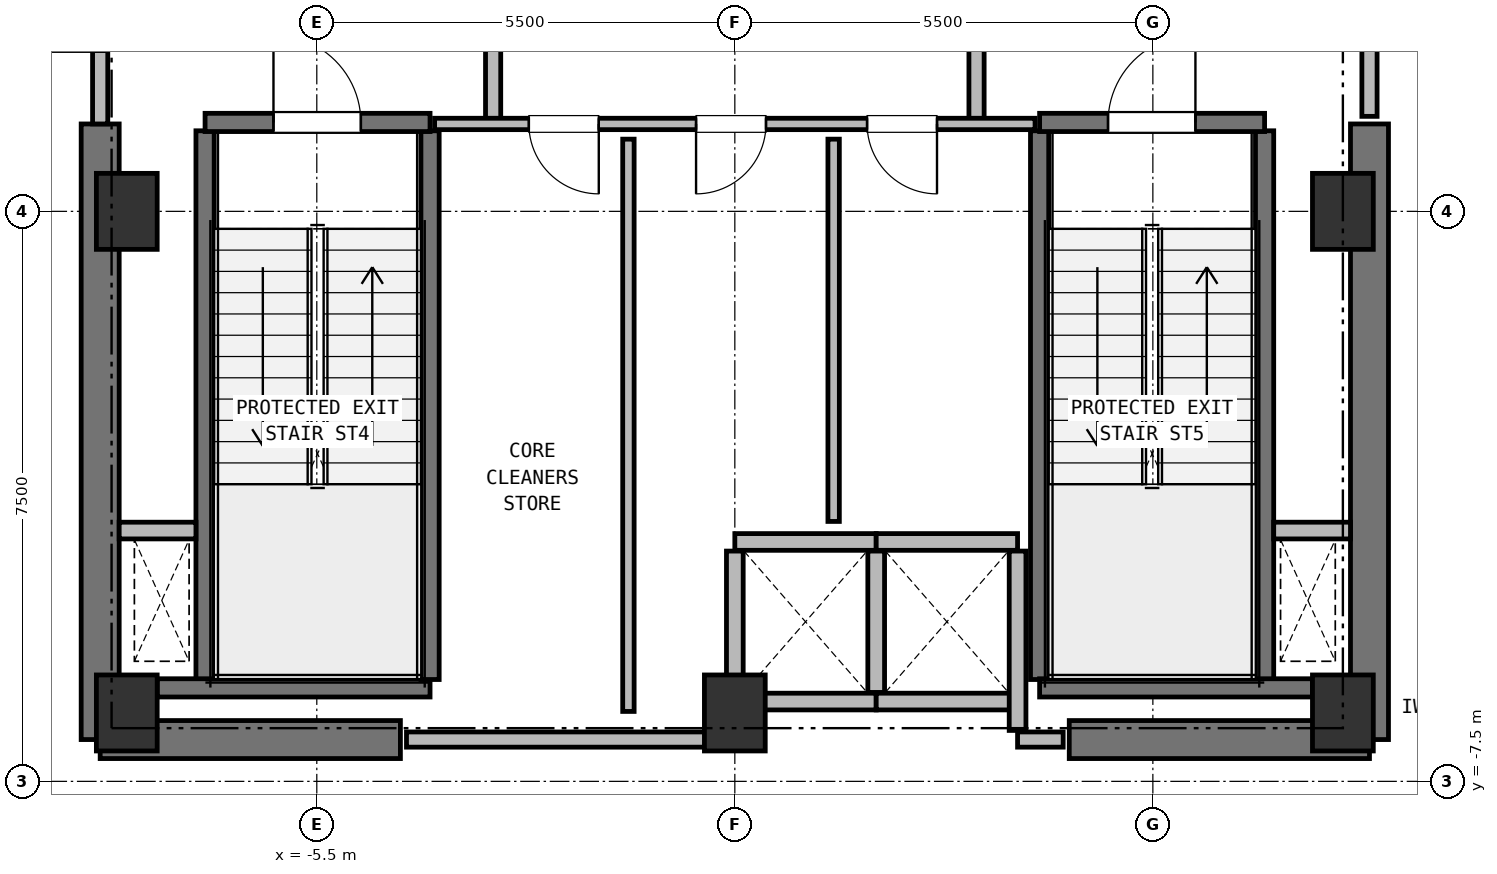
"""IFC4 building model, lengths in metres.
Left out: names, types, materials, properties, quantities, classifications, styles, units other than length and angle.
Written with IfcOpenShell. Run it as: python <this file> out.ifc"""

import sys

from ifc_helpers import new_model, si_unit, direction, frame, frame_2d, origin, origin_2d, place, context, subcontext, project, spatial, rectangle, extrude, element, fill, save


model = new_model("IFC4")
c1 = context("Model", 3, precision=1e-05, world=origin(), true_north=direction((0.0, 1.0)))
c2 = subcontext(c1, "Body", "Model", "MODEL_VIEW")
j1 = project(units=[si_unit("LENGTHUNIT", "METRE"), si_unit("PLANEANGLEUNIT", "RADIAN")], contexts=[c1])
p1 = place(None, origin())
s1 = spatial("IfcSite", under=j1, at=p1, CompositionType="ELEMENT")
p2 = place(p1, origin())
s2 = spatial("IfcBuilding", under=s1, at=p2, CompositionType="ELEMENT")
p3 = place(p2, frame((0.0, 0.0, 178.25)))
s3 = spatial("IfcBuildingStorey", under=s2, at=p3, CompositionType="ELEMENT", Elevation=178.25)
for number, where, z_axis, x_axis in (
    (1, (-8.0, -6.6, 0.0), (0.0, 0.0, 1.0), (1.0, 0.0, 0.0)),
    (2, (0.0, -6.6, 0.0), (0.0, 0.0, 1.0), (1.0, 0.0, 0.0)),
    (3, (8.0, -6.6, 0.0), (0.0, 0.0, 1.0), (1.0, 0.0, 0.0)),
    (4, (8.0, 0.0, 0.0), (0.0, 0.0, 1.0), (1.0, 0.0, 0.0)),
    (5, (-8.0, 0.0, 0.0), (0.0, 0.0, 1.0), (1.0, 0.0, 0.0)),
):
    element("IfcColumn", number, at=place(p3, frame(where, z_axis=z_axis, x_axis=x_axis)), inside=s3, PredefinedType="COLUMN", context=c2, shape_type="SweptSolid", body=[
        extrude(rectangle(XDim=0.8, YDim=1.0, at=origin_2d()), origin(), (0.0, 0.0, 1.0), 4.5),
    ])
for number, where, z_axis, x_axis in (
    (6, (-8.35, -6.95, 0.0), (0.0, 0.0, 1.0), (1.0, 0.0, 0.0)),
    (7, (4.4, -6.95, 0.0), (0.0, 0.0, 1.0), (1.0, 0.0, 0.0)),
):
    element("IfcWall", number, at=place(p3, frame(where, z_axis=z_axis, x_axis=x_axis)), inside=s3, PredefinedType="SHEAR", context=c2, shape_type="SweptSolid", body=[
        extrude(rectangle(XDim=3.95, YDim=0.5, at=frame_2d((1.975, 0.0))), origin(), (0.0, 0.0, 1.0), 4.25),
    ])
for number, where, z_axis, x_axis in (
    (8, (-8.35, -6.95, 0.0), (0.0, 0.0, 1.0), (0.0, 1.0, 0.0)),
    (9, (8.35, -6.95, 0.0), (0.0, 0.0, 1.0), (0.0, 1.0, 0.0)),
):
    element("IfcWall", number, at=place(p3, frame(where, z_axis=z_axis, x_axis=x_axis)), inside=s3, PredefinedType="SHEAR", context=c2, shape_type="SweptSolid", body=[
        extrude(rectangle(XDim=8.1, YDim=0.5, at=frame_2d((4.05, 0.0))), origin(), (0.0, 0.0, 1.0), 4.25),
    ])
p4 = place(p3, frame((13.395, -4.799, 0.0), z_axis=(0.0, 0.0, 1.0), x_axis=(-0.629314777839, -0.777150506912, 0.0)))
e10 = element("IfcWall", 10, at=p4, inside=s3, PredefinedType="SOLIDWALL", context=c2, shape_type="SweptSolid", body=[
    extrude(rectangle(XDim=9.4, YDim=0.36, at=frame_2d((4.7, 0.0))), origin(), (0.0, 0.0, 1.0), 3.93),
])
p5 = place(p4, frame((3.875, 0.0, 0.0)))
e11 = element("IfcOpeningElement", 11, at=p5, cuts=e10, PredefinedType="OPENING", context=c2, shape_type="SweptSolid", body=[
    extrude(rectangle(XDim=1.65, YDim=2.25, at=frame_2d((0.825, 1.125))), frame((0.0, 0.19, 0.0), z_axis=(0.0, -1.0, 0.0), x_axis=(1.0, 0.0, 0.0)), (0.0, 0.0, 1.0), 0.38),
])
p6 = place(p3, frame((-6.97, -6.16, 0.0), z_axis=(0.0, 0.0, 1.0), x_axis=(0.0, 1.0, 0.0)))
e12 = element("IfcWall", 12, at=p6, inside=s3, PredefinedType="SHEAR", context=c2, shape_type="SweptSolid", body=[
    extrude(rectangle(XDim=7.22, YDim=0.24, at=frame_2d((3.61, 0.0))), origin(), (0.0, 0.0, 1.0), 4.25),
])
p7 = place(p3, frame((-7.6, -6.27, 0.0), z_axis=(0.0, 0.0, 1.0), x_axis=(1.0, 0.0, 0.0)))
e13 = element("IfcWall", 13, at=p7, inside=s3, PredefinedType="SHEAR", context=c2, shape_type="SweptSolid", body=[
    extrude(rectangle(XDim=3.59, YDim=0.24, at=frame_2d((1.795, 0.0))), origin(), (0.0, 0.0, 1.0), 4.25),
])
p8 = place(p3, frame((-4.01, -6.16, 0.0), z_axis=(0.0, 0.0, 1.0), x_axis=(0.0, 1.0, 0.0)))
e14 = element("IfcWall", 14, at=p8, inside=s3, PredefinedType="SHEAR", context=c2, shape_type="SweptSolid", body=[
    extrude(rectangle(XDim=7.22, YDim=0.24, at=frame_2d((3.61, 0.0))), origin(), (0.0, 0.0, 1.0), 4.25),
])
p9 = place(p3, frame((-6.97, 1.17, 0.0), z_axis=(0.0, 0.0, 1.0), x_axis=(1.0, 0.0, 0.0)))
e15 = element("IfcWall", 15, at=p9, inside=s3, PredefinedType="SHEAR", context=c2, shape_type="SweptSolid", body=[
    extrude(rectangle(XDim=2.96, YDim=0.24, at=frame_2d((1.48, 0.0))), origin(), (0.0, 0.0, 1.0), 4.25),
])
p10 = place(p9, frame((0.9, 0.0, 0.0)))
e16 = element("IfcOpeningElement", 16, at=p10, cuts=e15, PredefinedType="OPENING", context=c2, shape_type="SweptSolid", body=[
    extrude(rectangle(XDim=1.15, YDim=2.15, at=frame_2d((0.575, 1.075))), frame((0.0, 0.13, 0.0), z_axis=(0.0, -1.0, 0.0), x_axis=(1.0, 0.0, 0.0)), (0.0, 0.0, 1.0), 0.26),
])
for number, where, z_axis, x_axis in (
    (17, (4.01, -6.16, 0.0), (0.0, 0.0, 1.0), (0.0, 1.0, 0.0)),
    (18, (6.97, -6.16, 0.0), (0.0, 0.0, 1.0), (0.0, 1.0, 0.0)),
):
    element("IfcWall", number, at=place(p3, frame(where, z_axis=z_axis, x_axis=x_axis)), inside=s3, PredefinedType="SHEAR", context=c2, shape_type="SweptSolid", body=[
        extrude(rectangle(XDim=7.22, YDim=0.24, at=frame_2d((3.61, 0.0))), origin(), (0.0, 0.0, 1.0), 4.25),
    ])
p11 = place(p3, frame((4.01, -6.27, 0.0), z_axis=(0.0, 0.0, 1.0), x_axis=(1.0, 0.0, 0.0)))
e19 = element("IfcWall", 19, at=p11, inside=s3, PredefinedType="SHEAR", context=c2, shape_type="SweptSolid", body=[
    extrude(rectangle(XDim=3.59, YDim=0.24, at=frame_2d((1.795, 0.0))), origin(), (0.0, 0.0, 1.0), 4.25),
])
p12 = place(p3, frame((4.01, 1.17, 0.0), z_axis=(0.0, 0.0, 1.0), x_axis=(1.0, 0.0, 0.0)))
e20 = element("IfcWall", 20, at=p12, inside=s3, PredefinedType="SHEAR", context=c2, shape_type="SweptSolid", body=[
    extrude(rectangle(XDim=2.96, YDim=0.24, at=frame_2d((1.48, 0.0))), origin(), (0.0, 0.0, 1.0), 4.25),
])
p13 = place(p12, frame((0.9, 0.0, 0.0)))
e21 = element("IfcOpeningElement", 21, at=p13, cuts=e20, PredefinedType="OPENING", context=c2, shape_type="SweptSolid", body=[
    extrude(rectangle(XDim=1.15, YDim=2.15, at=frame_2d((0.575, 1.075))), frame((0.0, 0.13, 0.0), z_axis=(0.0, -1.0, 0.0), x_axis=(1.0, 0.0, 0.0)), (0.0, 0.0, 1.0), 0.26),
])
for number, where, z_axis, x_axis in (
    (22, (-8.1, -4.2, 0.0), (0.0, 0.0, 1.0), (1.0, 0.0, 0.0)),
    (23, (7.09, -4.2, 0.0), (0.0, 0.0, 1.0), (1.0, 0.0, 0.0)),
):
    element("IfcWall", number, at=place(p3, frame(where, z_axis=z_axis, x_axis=x_axis)), inside=s3, PredefinedType="PARTITIONING", context=c2, shape_type="SweptSolid", body=[
        extrude(rectangle(XDim=1.01, YDim=0.22, at=frame_2d((0.505, 0.0))), origin(), (0.0, 0.0, 1.0), 4.25),
    ])
p14 = place(p3, frame((0.0, -6.45, 0.0), z_axis=(0.0, 0.0, 1.0), x_axis=(1.0, 0.0, 0.0)))
e24 = element("IfcWall", 24, at=p14, inside=s3, PredefinedType="PARTITIONING", context=c2, shape_type="SweptSolid", body=[
    extrude(rectangle(XDim=1.86, YDim=0.22, at=frame_2d((0.93, 0.0))), origin(), (0.0, 0.0, 1.0), 3.88),
])
for number, where, z_axis, x_axis in (
    (25, (0.0, -4.35, 0.0), (0.0, 0.0, 1.0), (1.0, 0.0, 0.0)),
    (26, (0.0, -6.33, 0.0), (0.0, 0.0, 1.0), (0.0, 1.0, 0.0)),
    (27, (1.86, -6.33, 0.0), (0.0, 0.0, 1.0), (0.0, 1.0, 0.0)),
):
    element("IfcWall", number, at=place(p3, frame(where, z_axis=z_axis, x_axis=x_axis)), inside=s3, PredefinedType="PARTITIONING", context=c2, shape_type="SweptSolid", body=[
        extrude(rectangle(XDim=1.86, YDim=0.22, at=frame_2d((0.93, 0.0))), origin(), (0.0, 0.0, 1.0), 4.25),
    ])
p15 = place(p3, frame((1.86, -6.45, 0.0), z_axis=(0.0, 0.0, 1.0), x_axis=(1.0, 0.0, 0.0)))
e28 = element("IfcWall", 28, at=p15, inside=s3, PredefinedType="PARTITIONING", context=c2, shape_type="SweptSolid", body=[
    extrude(rectangle(XDim=1.86, YDim=0.22, at=frame_2d((0.93, 0.0))), origin(), (0.0, 0.0, 1.0), 3.88),
])
p16 = place(p3, frame((1.86, -4.35, 0.0), z_axis=(0.0, 0.0, 1.0), x_axis=(1.0, 0.0, 0.0)))
e29 = element("IfcWall", 29, at=p16, inside=s3, PredefinedType="PARTITIONING", context=c2, shape_type="SweptSolid", body=[
    extrude(rectangle(XDim=1.86, YDim=0.22, at=frame_2d((0.93, 0.0))), origin(), (0.0, 0.0, 1.0), 4.25),
])
p17 = place(p3, frame((3.72, -6.83, 0.0), z_axis=(0.0, 0.0, 1.0), x_axis=(0.0, 1.0, 0.0)))
e30 = element("IfcWall", 30, at=p17, inside=s3, PredefinedType="PARTITIONING", context=c2, shape_type="SweptSolid", body=[
    extrude(rectangle(XDim=2.36, YDim=0.22, at=frame_2d((1.18, 0.0))), origin(), (0.0, 0.0, 1.0), 4.25),
])
p18 = place(p3, frame((-3.18, 1.15, 0.0), z_axis=(0.0, 0.0, 1.0), x_axis=(0.0, 1.0, 0.0)))
e31 = element("IfcWall", 31, at=p18, inside=s3, PredefinedType="PARTITIONING", context=c2, shape_type="SweptSolid", body=[
    extrude(rectangle(XDim=3.3, YDim=0.2, at=frame_2d((1.65, 0.0))), origin(), (0.0, 0.0, 1.0), 4.25),
])
p19 = place(p18, frame((1.08, 0.0, 0.0)))
e32 = element("IfcOpeningElement", 32, at=p19, cuts=e31, PredefinedType="OPENING", context=c2, shape_type="SweptSolid", body=[
    extrude(rectangle(XDim=1.15, YDim=2.15, at=frame_2d((0.575, 1.075))), frame((0.0, 0.11, 0.0), z_axis=(0.0, -1.0, 0.0), x_axis=(1.0, 0.0, 0.0)), (0.0, 0.0, 1.0), 0.22),
])
p20 = place(p3, frame((3.18, 1.15, 0.0), z_axis=(0.0, 0.0, 1.0), x_axis=(0.0, 1.0, 0.0)))
e33 = element("IfcWall", 33, at=p20, inside=s3, PredefinedType="PARTITIONING", context=c2, shape_type="SweptSolid", body=[
    extrude(rectangle(XDim=3.3, YDim=0.2, at=frame_2d((1.65, 0.0))), origin(), (0.0, 0.0, 1.0), 4.25),
])
p21 = place(p20, frame((1.08, 0.0, 0.0)))
e34 = element("IfcOpeningElement", 34, at=p21, cuts=e33, PredefinedType="OPENING", context=c2, shape_type="SweptSolid", body=[
    extrude(rectangle(XDim=1.15, YDim=2.15, at=frame_2d((0.575, 1.075))), frame((0.0, 0.11, 0.0), z_axis=(0.0, -1.0, 0.0), x_axis=(1.0, 0.0, 0.0)), (0.0, 0.0, 1.0), 0.22),
])
p22 = place(p3, frame((-8.35, 1.15, 0.0), z_axis=(0.0, 0.0, 1.0), x_axis=(0.0, 1.0, 0.0)))
e35 = element("IfcWall", 35, at=p22, inside=s3, PredefinedType="PARTITIONING", context=c2, shape_type="SweptSolid", body=[
    extrude(rectangle(XDim=5.4, YDim=0.2, at=frame_2d((2.7, 0.0))), origin(), (0.0, 0.0, 1.0), 4.25),
])
p23 = place(p22, frame((0.95, 0.0, 0.0)))
e36 = element("IfcOpeningElement", 36, at=p23, cuts=e35, PredefinedType="OPENING", context=c2, shape_type="SweptSolid", body=[
    extrude(rectangle(XDim=1.15, YDim=2.15, at=frame_2d((0.575, 1.075))), frame((0.0, 0.11, 0.0), z_axis=(0.0, -1.0, 0.0), x_axis=(1.0, 0.0, 0.0)), (0.0, 0.0, 1.0), 0.22),
])
p24 = place(p3, frame((8.35, 1.25, 0.0), z_axis=(0.0, 0.0, 1.0), x_axis=(0.0, 1.0, 0.0)))
e37 = element("IfcWall", 37, at=p24, inside=s3, PredefinedType="PARTITIONING", context=c2, shape_type="SweptSolid", body=[
    extrude(rectangle(XDim=5.3, YDim=0.2, at=frame_2d((2.65, 0.0))), origin(), (0.0, 0.0, 1.0), 4.25),
])
p25 = place(p24, frame((0.95, 0.0, 0.0)))
e38 = element("IfcOpeningElement", 38, at=p25, cuts=e37, PredefinedType="OPENING", context=c2, shape_type="SweptSolid", body=[
    extrude(rectangle(XDim=1.15, YDim=2.15, at=frame_2d((0.575, 1.075))), frame((0.0, 0.11, 0.0), z_axis=(0.0, -1.0, 0.0), x_axis=(1.0, 0.0, 0.0)), (0.0, 0.0, 1.0), 0.22),
])
p26 = place(p3, frame((3.95, 1.15, 0.0), z_axis=(0.0, 0.0, 1.0), x_axis=(-1.0, 0.0, 0.0)))
e39 = element("IfcWall", 39, at=p26, inside=s3, PredefinedType="PARTITIONING", context=c2, shape_type="SweptSolid", body=[
    extrude(rectangle(XDim=7.9, YDim=0.15, at=frame_2d((3.95, 0.0))), origin(), (0.0, 0.0, 1.0), 4.25),
])
p27 = place(p26, frame((5.74, 0.0, 0.0)))
e40 = element("IfcOpeningElement", 40, at=p27, cuts=e39, PredefinedType="OPENING", context=c2, shape_type="SweptSolid", body=[
    extrude(rectangle(XDim=0.92, YDim=2.05, at=frame_2d((0.46, 1.025))), frame((0.0, 0.085, 0.0), z_axis=(0.0, -1.0, 0.0), x_axis=(1.0, 0.0, 0.0)), (0.0, 0.0, 1.0), 0.17),
])
p28 = place(p26, frame((3.54, 0.0, 0.0)))
e41 = element("IfcOpeningElement", 41, at=p28, cuts=e39, PredefinedType="OPENING", context=c2, shape_type="SweptSolid", body=[
    extrude(rectangle(XDim=0.92, YDim=2.05, at=frame_2d((0.46, 1.025))), frame((0.0, 0.085, 0.0), z_axis=(0.0, -1.0, 0.0), x_axis=(1.0, 0.0, 0.0)), (0.0, 0.0, 1.0), 0.17),
])
p29 = place(p26, frame((1.29, 0.0, 0.0)))
e42 = element("IfcOpeningElement", 42, at=p29, cuts=e39, PredefinedType="OPENING", context=c2, shape_type="SweptSolid", body=[
    extrude(rectangle(XDim=0.92, YDim=2.05, at=frame_2d((0.46, 1.025))), frame((0.0, 0.085, 0.0), z_axis=(0.0, -1.0, 0.0), x_axis=(1.0, 0.0, 0.0)), (0.0, 0.0, 1.0), 0.17),
])
p30 = place(p3, frame((-4.32, -6.95, 0.0), z_axis=(0.0, 0.0, 1.0), x_axis=(1.0, 0.0, 0.0)))
e43 = element("IfcWall", 43, at=p30, inside=s3, PredefinedType="PARTITIONING", context=c2, shape_type="SweptSolid", body=[
    extrude(rectangle(XDim=4.32, YDim=0.2, at=frame_2d((2.16, 0.0))), origin(), (0.0, 0.0, 1.0), 4.25),
])
p31 = place(p3, frame((3.72, -6.95, 0.0), z_axis=(0.0, 0.0, 1.0), x_axis=(1.0, 0.0, 0.0)))
e44 = element("IfcWall", 44, at=p31, inside=s3, PredefinedType="PARTITIONING", context=c2, shape_type="SweptSolid", body=[
    extrude(rectangle(XDim=0.6, YDim=0.2, at=frame_2d((0.3, 0.0))), origin(), (0.0, 0.0, 1.0), 4.25),
])
p32 = place(p3, frame((-1.4, -6.58, 0.0), z_axis=(0.0, 0.0, 1.0), x_axis=(0.0, 1.0, 0.0)))
e45 = element("IfcWall", 45, at=p32, inside=s3, PredefinedType="PARTITIONING", context=c2, shape_type="SweptSolid", body=[
    extrude(rectangle(XDim=7.53, YDim=0.15, at=frame_2d((3.765, 0.0))), origin(), (0.0, 0.0, 1.0), 4.25),
])
p33 = place(p3, frame((1.3, -4.08, 0.0), z_axis=(0.0, 0.0, 1.0), x_axis=(0.0, 1.0, 0.0)))
e46 = element("IfcWall", 46, at=p33, inside=s3, PredefinedType="PARTITIONING", context=c2, shape_type="SweptSolid", body=[
    extrude(rectangle(XDim=5.03, YDim=0.15, at=frame_2d((2.515, 0.0))), origin(), (0.0, 0.0, 1.0), 4.25),
])
for number, where, z_axis, x_axis in (
    (47, (10.422, -7.309, 0.0), (0.0, 0.0, 1.0), (-0.694, -0.72, 0.0)),
    (48, (-8.648, -9.151, 0.0), (0.0, 0.0, 1.0), (-0.694, 0.72, 0.0)),
):
    element("IfcWall", number, at=place(p3, frame(where, z_axis=z_axis, x_axis=x_axis)), inside=s3, PredefinedType="PARTITIONING", context=c2, shape_type="SweptSolid", body=[
        extrude(rectangle(XDim=2.558, YDim=0.15, at=frame_2d((1.279, 0.0))), origin(), (0.0, 0.0, 1.0), 3.93),
    ])
p34 = place(p10, origin())
e49 = element("IfcDoor", 49, at=p34, inside=s3, OperationType="SINGLE_SWING_LEFT", PredefinedType="DOOR", context=c2, shape_type="SweptSolid", body=[
    extrude(rectangle(XDim=1.15, YDim=2.15, at=frame_2d((0.575, 1.075))), frame((0.0, 0.025, 0.0), z_axis=(0.0, -1.0, 0.0), x_axis=(1.0, 0.0, 0.0)), (0.0, 0.0, 1.0), 0.05),
])
fill(e16, e49)
p35 = place(p13, origin())
e50 = element("IfcDoor", 50, at=p35, inside=s3, OperationType="SINGLE_SWING_RIGHT", PredefinedType="DOOR", context=c2, shape_type="SweptSolid", body=[
    extrude(rectangle(XDim=1.15, YDim=2.15, at=frame_2d((0.575, 1.075))), frame((0.0, 0.025, 0.0), z_axis=(0.0, -1.0, 0.0), x_axis=(1.0, 0.0, 0.0)), (0.0, 0.0, 1.0), 0.05),
])
fill(e21, e50)
p36 = place(p23, origin())
e51 = element("IfcDoor", 51, at=p36, inside=s3, OperationType="SINGLE_SWING_LEFT", PredefinedType="DOOR", context=c2, shape_type="SweptSolid", body=[
    extrude(rectangle(XDim=1.15, YDim=2.15, at=frame_2d((0.575, 1.075))), frame((0.0, 0.025, 0.0), z_axis=(0.0, -1.0, 0.0), x_axis=(1.0, 0.0, 0.0)), (0.0, 0.0, 1.0), 0.05),
])
fill(e36, e51)
p37 = place(p27, origin())
e52 = element("IfcDoor", 52, at=p37, inside=s3, OperationType="SINGLE_SWING_LEFT", PredefinedType="DOOR", context=c2, shape_type="SweptSolid", body=[
    extrude(rectangle(XDim=0.92, YDim=2.05, at=frame_2d((0.46, 1.025))), frame((0.0, 0.025, 0.0), z_axis=(0.0, -1.0, 0.0), x_axis=(1.0, 0.0, 0.0)), (0.0, 0.0, 1.0), 0.05),
])
fill(e40, e52)
p38 = place(p28, origin())
e53 = element("IfcDoor", 53, at=p38, inside=s3, OperationType="SINGLE_SWING_RIGHT", PredefinedType="DOOR", context=c2, shape_type="SweptSolid", body=[
    extrude(rectangle(XDim=0.92, YDim=2.05, at=frame_2d((0.46, 1.025))), frame((0.0, 0.025, 0.0), z_axis=(0.0, -1.0, 0.0), x_axis=(1.0, 0.0, 0.0)), (0.0, 0.0, 1.0), 0.05),
])
fill(e41, e53)
p39 = place(p29, origin())
e54 = element("IfcDoor", 54, at=p39, inside=s3, OperationType="SINGLE_SWING_LEFT", PredefinedType="DOOR", context=c2, shape_type="SweptSolid", body=[
    extrude(rectangle(XDim=0.92, YDim=2.05, at=frame_2d((0.46, 1.025))), frame((0.0, 0.025, 0.0), z_axis=(0.0, -1.0, 0.0), x_axis=(1.0, 0.0, 0.0)), (0.0, 0.0, 1.0), 0.05),
])
fill(e42, e54)
save(model, sys.argv[1])
